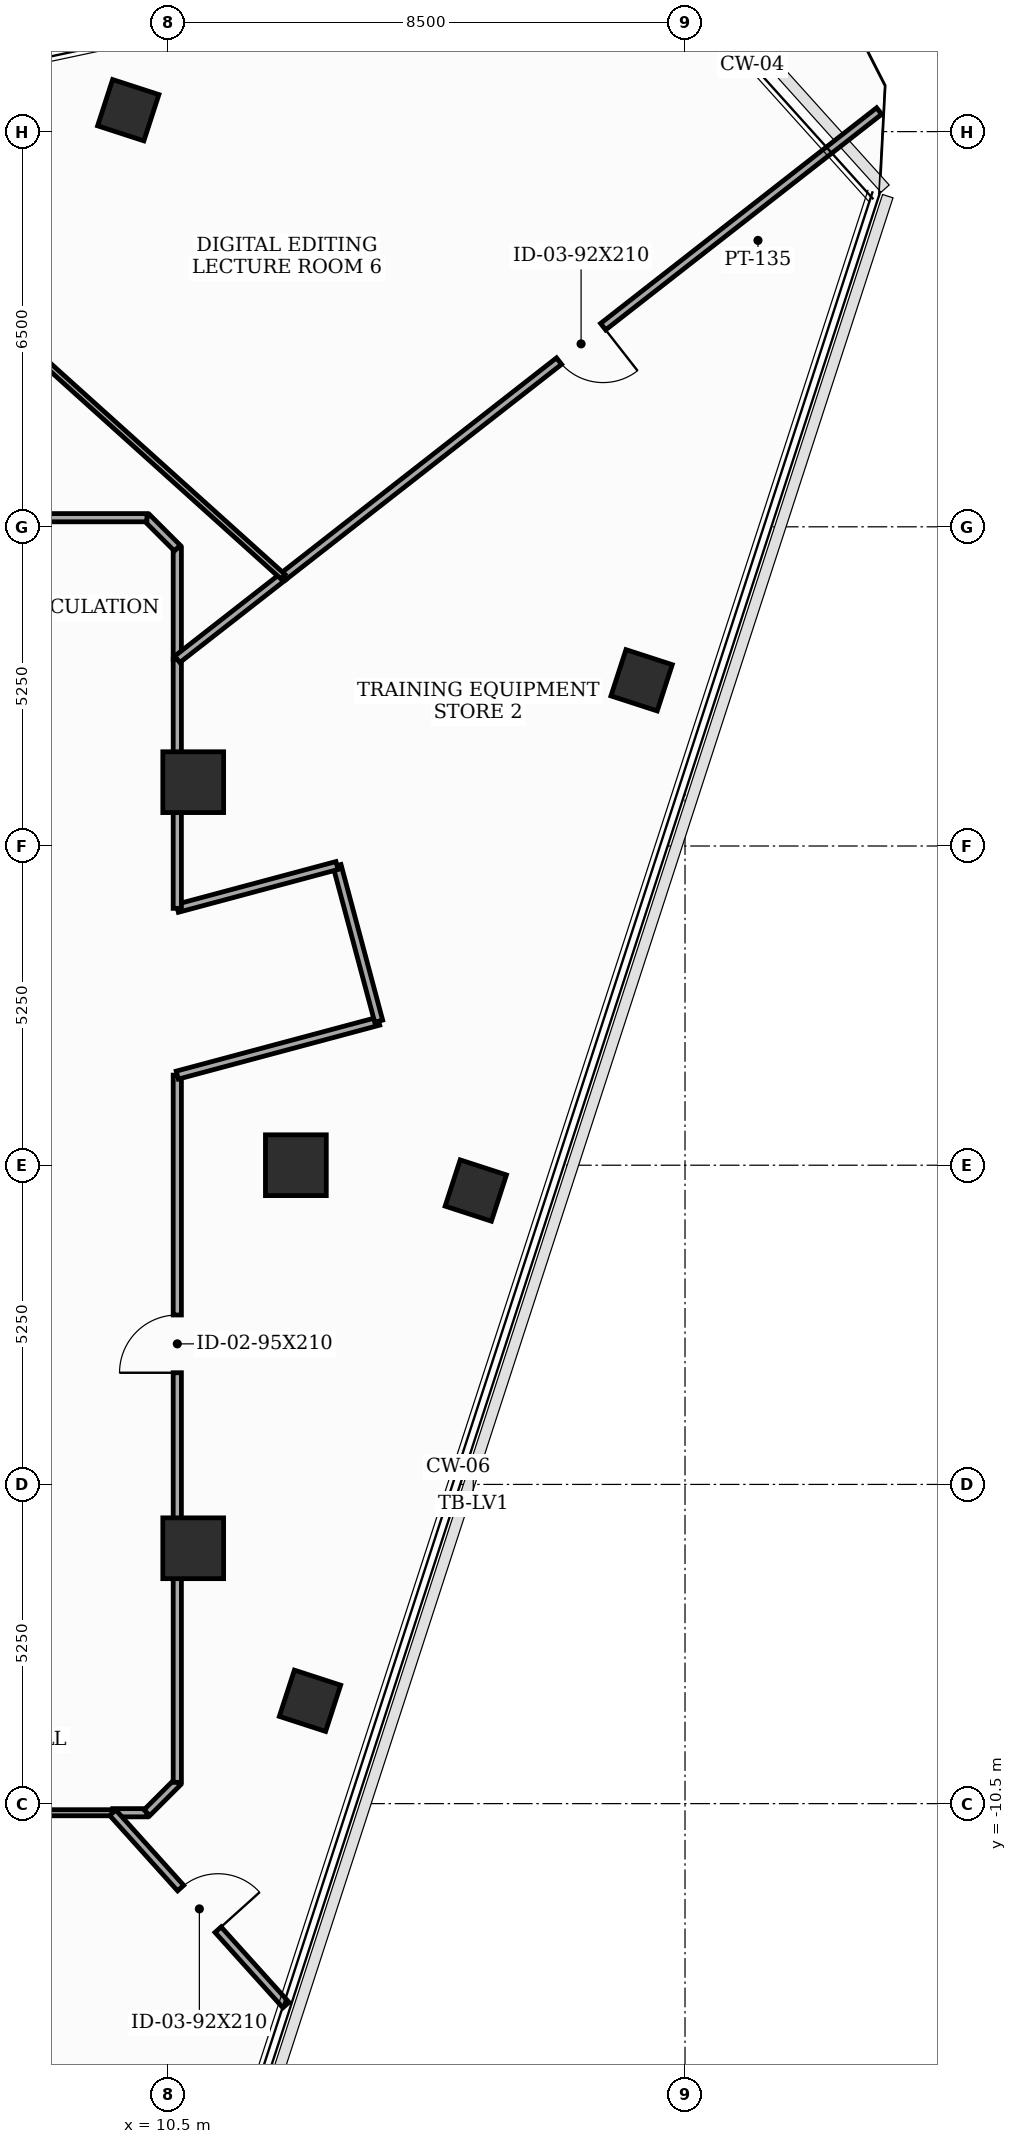
"""IFC4 building model, lengths in metres.
Left out: names, types, materials, properties, quantities, classifications, styles, units other than length and angle.
Written with IfcOpenShell. Run it as: python <this file> out.ifc"""

import sys

from ifc_helpers import new_model, si_unit, direction, frame, frame_2d, origin, origin_2d, place, context, subcontext, project, spatial, rectangle, extrude, element, fill, save


model = new_model("IFC4")
c1 = context("Model", 3, precision=1e-05, world=origin(), true_north=direction((0.0, 1.0)))
c2 = subcontext(c1, "Body", "Model", "MODEL_VIEW")
j1 = project(units=[si_unit("LENGTHUNIT", "METRE"), si_unit("PLANEANGLEUNIT", "RADIAN")], contexts=[c1])
p1 = place(None, origin())
s1 = spatial("IfcSite", under=j1, at=p1, CompositionType="ELEMENT")
p2 = place(p1, origin())
s2 = spatial("IfcBuilding", under=s1, at=p2, CompositionType="ELEMENT")
p3 = place(p2, frame((0.0, 0.0, 286.9)))
s3 = spatial("IfcBuildingStorey", under=s2, at=p3, CompositionType="ELEMENT", Elevation=286.9)
for number, where, z_axis, x_axis in (
    (1, (12.6, 0.0, 0.0), (0.0, 0.0, 1.0), (1.0, 0.0, 0.0)),
    (2, (10.912, 6.3, 0.0), (0.0, 0.0, 1.0), (1.0, 0.0, 0.0)),
    (3, (10.912, -6.3, 0.0), (0.0, 0.0, 1.0), (1.0, 0.0, 0.0)),
):
    element("IfcColumn", number, at=place(p3, frame(where, z_axis=z_axis, x_axis=x_axis)), inside=s3, PredefinedType="COLUMN", context=c2, shape_type="SweptSolid", body=[
        extrude(rectangle(XDim=1.0, YDim=1.0, at=origin_2d()), origin(), (0.0, 0.0, 1.0), 3.7),
    ])
for number, where, z_axis, x_axis in (
    (4, (12.833, -8.809, 0.0), (0.0, 0.0, 1.0), (0.309, 0.951, 0.0)),
    (5, (15.559, -0.417, 0.0), (0.0, 0.0, 1.0), (0.309, 0.951, 0.0)),
    (6, (18.286, 7.976, 0.0), (0.0, 0.0, 1.0), (0.309, 0.951, 0.0)),
    (7, (9.844, 17.352, 0.0), (0.0, 0.0, 1.0), (0.309, 0.951, 0.0)),
):
    element("IfcColumn", number, at=place(p3, frame(where, z_axis=z_axis, x_axis=x_axis)), inside=s3, PredefinedType="COLUMN", context=c2, shape_type="SweptSolid", body=[
        extrude(rectangle(XDim=0.8, YDim=0.8, at=origin_2d()), origin(), (0.0, 0.0, 1.0), 3.7),
    ])
p4 = place(p3, frame((9.589, -10.65, 0.0), z_axis=(0.0, 0.0, 1.0), x_axis=(1.0, 0.0, 0.0)))
e8 = element("IfcWall", 8, at=p4, inside=s3, PredefinedType="PARTITIONING", context=c2, shape_type="SweptSolid", body=[
    extrude(rectangle(XDim=0.561, YDim=0.135, at=frame_2d((0.28, 0.0))), origin(), (0.0, 0.0, 1.0), 3.5),
])
p5 = place(p3, frame((10.15, -10.65, 0.0), z_axis=(0.0, 0.0, 1.0), x_axis=(0.707106781187, 0.707106781187, 0.0)))
e9 = element("IfcWall", 9, at=p5, inside=s3, PredefinedType="PARTITIONING", context=c2, shape_type="SweptSolid", body=[
    extrude(rectangle(XDim=0.707, YDim=0.135, at=frame_2d((0.354, 0.0))), origin(), (0.0, 0.0, 1.0), 3.5),
])
p6 = place(p3, frame((10.65, -10.15, 0.0), z_axis=(0.0, 0.0, 1.0), x_axis=(0.0, 1.0, 0.0)))
e10 = element("IfcWall", 10, at=p6, inside=s3, PredefinedType="PARTITIONING", context=c2, shape_type="SweptSolid", body=[
    extrude(rectangle(XDim=11.632, YDim=0.135, at=frame_2d((5.816, 0.0))), origin(), (0.0, 0.0, 1.0), 2.885),
])
p7 = place(p6, frame((6.737, 0.0, 0.0)))
e11 = element("IfcOpeningElement", 11, at=p7, cuts=e10, PredefinedType="OPENING", context=c2, shape_type="SweptSolid", body=[
    extrude(rectangle(XDim=0.95, YDim=2.1, at=frame_2d((0.475, 1.05))), frame((0.0, 0.077, 0.0), z_axis=(0.0, -1.0, 0.0), x_axis=(1.0, 0.0, 0.0)), (0.0, 0.0, 1.0), 0.155),
])
p8 = place(p3, frame((10.65, 1.482, 0.0), z_axis=(0.0, 0.0, 1.0), x_axis=(0.965961397105, 0.2586862565, 0.0)))
e12 = element("IfcWall", 12, at=p8, inside=s3, PredefinedType="PARTITIONING", context=c2, shape_type="SweptSolid", body=[
    extrude(rectangle(XDim=3.429, YDim=0.135, at=frame_2d((1.714, 0.0))), origin(), (0.0, 0.0, 1.0), 2.885),
])
p9 = place(p3, frame((13.962, 2.369, 0.0), z_axis=(0.0, 0.0, 1.0), x_axis=(-0.258413725385, 0.966034340245, 0.0)))
e13 = element("IfcWall", 13, at=p9, inside=s3, PredefinedType="PARTITIONING", context=c2, shape_type="SweptSolid", body=[
    extrude(rectangle(XDim=2.65, YDim=0.135, at=frame_2d((1.325, 0.0))), origin(), (0.0, 0.0, 1.0), 3.5),
])
p10 = place(p3, frame((13.277, 4.929, 0.0), z_axis=(0.0, 0.0, 1.0), x_axis=(-0.965934830229, -0.258785439601, 0.0)))
e14 = element("IfcWall", 14, at=p10, inside=s3, PredefinedType="PARTITIONING", context=c2, shape_type="SweptSolid", body=[
    extrude(rectangle(XDim=2.72, YDim=0.135, at=frame_2d((1.36, 0.0))), origin(), (0.0, 0.0, 1.0), 2.885),
])
p11 = place(p3, frame((10.65, 4.225, 0.0), z_axis=(0.0, 0.0, 1.0), x_axis=(0.0, 1.0, 0.0)))
e15 = element("IfcWall", 15, at=p11, inside=s3, PredefinedType="PARTITIONING", context=c2, shape_type="SweptSolid", body=[
    extrude(rectangle(XDim=4.096, YDim=0.135, at=frame_2d((2.048, 0.0))), origin(), (0.0, 0.0, 1.0), 2.885),
])
p12 = place(p3, frame((2.45, -10.65, 0.0), z_axis=(0.0, 0.0, 1.0), x_axis=(1.0, 0.0, 0.0)))
e16 = element("IfcWall", 16, at=p12, inside=s3, PredefinedType="MOVABLE", context=c2, shape_type="SweptSolid", body=[
    extrude(rectangle(XDim=7.139, YDim=0.1, at=frame_2d((3.57, 0.0))), origin(), (0.0, 0.0, 1.0), 2.885),
])
p13 = place(p3, frame((10.65, 8.321, 0.0), z_axis=(0.0, 0.0, 1.0), x_axis=(0.0, 1.0, 0.0)))
e17 = element("IfcWall", 17, at=p13, inside=s3, PredefinedType="PARTITIONING", context=c2, shape_type="SweptSolid", body=[
    extrude(rectangle(XDim=1.829, YDim=0.135, at=frame_2d((0.915, 0.0))), origin(), (0.0, 0.0, 1.0), 3.5),
])
p14 = place(p3, frame((10.65, 10.15, 0.0), z_axis=(0.0, 0.0, 1.0), x_axis=(-0.707106781187, 0.707106781187, 0.0)))
e18 = element("IfcWall", 18, at=p14, inside=s3, PredefinedType="PARTITIONING", context=c2, shape_type="SweptSolid", body=[
    extrude(rectangle(XDim=0.707, YDim=0.135, at=frame_2d((0.354, 0.0))), origin(), (0.0, 0.0, 1.0), 3.5),
])
p15 = place(p3, frame((10.15, 10.65, 0.0), z_axis=(0.0, 0.0, 1.0), x_axis=(-1.0, 0.0, 0.0)))
e19 = element("IfcWall", 19, at=p15, inside=s3, PredefinedType="PARTITIONING", context=c2, shape_type="SweptSolid", body=[
    extrude(rectangle(XDim=11.3, YDim=0.135, at=frame_2d((5.65, 0.0))), origin(), (0.0, 0.0, 1.0), 2.885),
])
p16 = place(p15, frame((6.531, 0.0, 0.0)))
e20 = element("IfcOpeningElement", 20, at=p16, cuts=e19, PredefinedType="OPENING", context=c2, shape_type="SweptSolid", body=[
    extrude(rectangle(XDim=0.95, YDim=2.1, at=frame_2d((0.475, 1.05))), frame((0.0, 0.077, 0.0), z_axis=(0.0, -1.0, 0.0), x_axis=(1.0, 0.0, 0.0)), (0.0, 0.0, 1.0), 0.155),
])
p17 = place(p3, frame((9.589, -10.65, 0.0), z_axis=(0.0, 0.0, 1.0), x_axis=(0.66916439333, -0.743114402161, 0.0)))
e21 = element("IfcWall", 21, at=p17, inside=s3, PredefinedType="PARTITIONING", context=c2, shape_type="SweptSolid", body=[
    extrude(rectangle(XDim=4.256, YDim=0.135, at=frame_2d((2.128, 0.0))), origin(), (0.0, 0.0, 1.0), 3.035),
])
p18 = place(p17, frame((1.668, 0.0, 0.0)))
e22 = element("IfcOpeningElement", 22, at=p18, cuts=e21, PredefinedType="OPENING", context=c2, shape_type="SweptSolid", body=[
    extrude(rectangle(XDim=0.92, YDim=2.1, at=frame_2d((0.46, 1.05))), frame((0.0, 0.077, 0.0), z_axis=(0.0, -1.0, 0.0), x_axis=(1.0, 0.0, 0.0)), (0.0, 0.0, 1.0), 0.155),
])
p19 = place(p3, frame((22.192, 17.338, 0.0), z_axis=(0.0, 0.0, 1.0), x_axis=(-0.788006224946, -0.615667271703, 0.0)))
e23 = element("IfcWall", 23, at=p19, inside=s3, PredefinedType="PARTITIONING", context=c2, shape_type="SweptSolid", body=[
    extrude(rectangle(XDim=12.441, YDim=0.135, at=frame_2d((6.22, 0.0))), origin(), (0.0, 0.0, 1.0), 3.035),
])
p20 = place(p19, frame((5.76, 0.0, 0.0)))
e24 = element("IfcOpeningElement", 24, at=p20, cuts=e23, PredefinedType="OPENING", context=c2, shape_type="SweptSolid", body=[
    extrude(rectangle(XDim=0.92, YDim=2.1, at=frame_2d((0.46, 1.05))), frame((0.0, 0.077, 0.0), z_axis=(0.0, -1.0, 0.0), x_axis=(1.0, 0.0, 0.0)), (0.0, 0.0, 1.0), 0.155),
])
p21 = place(p3, frame((12.389, 9.679, 0.0), z_axis=(0.0, 0.0, 1.0), x_axis=(-0.788177008199, -0.615448619908, 0.0)))
e25 = element("IfcWall", 25, at=p21, inside=s3, PredefinedType="PARTITIONING", context=c2, shape_type="SweptSolid", body=[
    extrude(rectangle(XDim=2.206, YDim=0.135, at=frame_2d((1.103, 0.0))), origin(), (0.0, 0.0, 1.0), 3.5),
])
p22 = place(p3, frame((8.019, 13.614, 0.0), z_axis=(0.0, 0.0, 1.0), x_axis=(0.743110388877, -0.669168850099, 0.0)))
e26 = element("IfcWall", 26, at=p22, inside=s3, PredefinedType="MOVABLE", context=c2, shape_type="SweptSolid", body=[
    extrude(rectangle(XDim=5.881, YDim=0.1, at=frame_2d((2.94, 0.0))), origin(), (0.0, 0.0, 1.0), 3.035),
])
p23 = place(p7, origin())
e27 = element("IfcDoor", 27, at=p23, inside=s3, OperationType="SINGLE_SWING_LEFT", PredefinedType="DOOR", context=c2, shape_type="SweptSolid", body=[
    extrude(rectangle(XDim=0.95, YDim=2.1, at=frame_2d((0.475, 1.05))), frame((0.0, 0.025, 0.0), z_axis=(0.0, -1.0, 0.0), x_axis=(1.0, 0.0, 0.0)), (0.0, 0.0, 1.0), 0.05),
])
fill(e11, e27)
p24 = place(p18, origin())
e28 = element("IfcDoor", 28, at=p24, inside=s3, OperationType="SINGLE_SWING_RIGHT", PredefinedType="DOOR", context=c2, shape_type="SweptSolid", body=[
    extrude(rectangle(XDim=0.92, YDim=2.1, at=frame_2d((0.46, 1.05))), frame((0.0, 0.025, 0.0), z_axis=(0.0, -1.0, 0.0), x_axis=(1.0, 0.0, 0.0)), (0.0, 0.0, 1.0), 0.05),
])
fill(e22, e28)
p25 = place(p20, origin())
e29 = element("IfcDoor", 29, at=p25, inside=s3, OperationType="SINGLE_SWING_LEFT", PredefinedType="DOOR", context=c2, shape_type="SweptSolid", body=[
    extrude(rectangle(XDim=0.92, YDim=2.1, at=frame_2d((0.46, 1.05))), frame((0.0, 0.025, 0.0), z_axis=(0.0, -1.0, 0.0), x_axis=(1.0, 0.0, 0.0)), (0.0, 0.0, 1.0), 0.05),
])
fill(e24, e29)
save(model, sys.argv[1])
